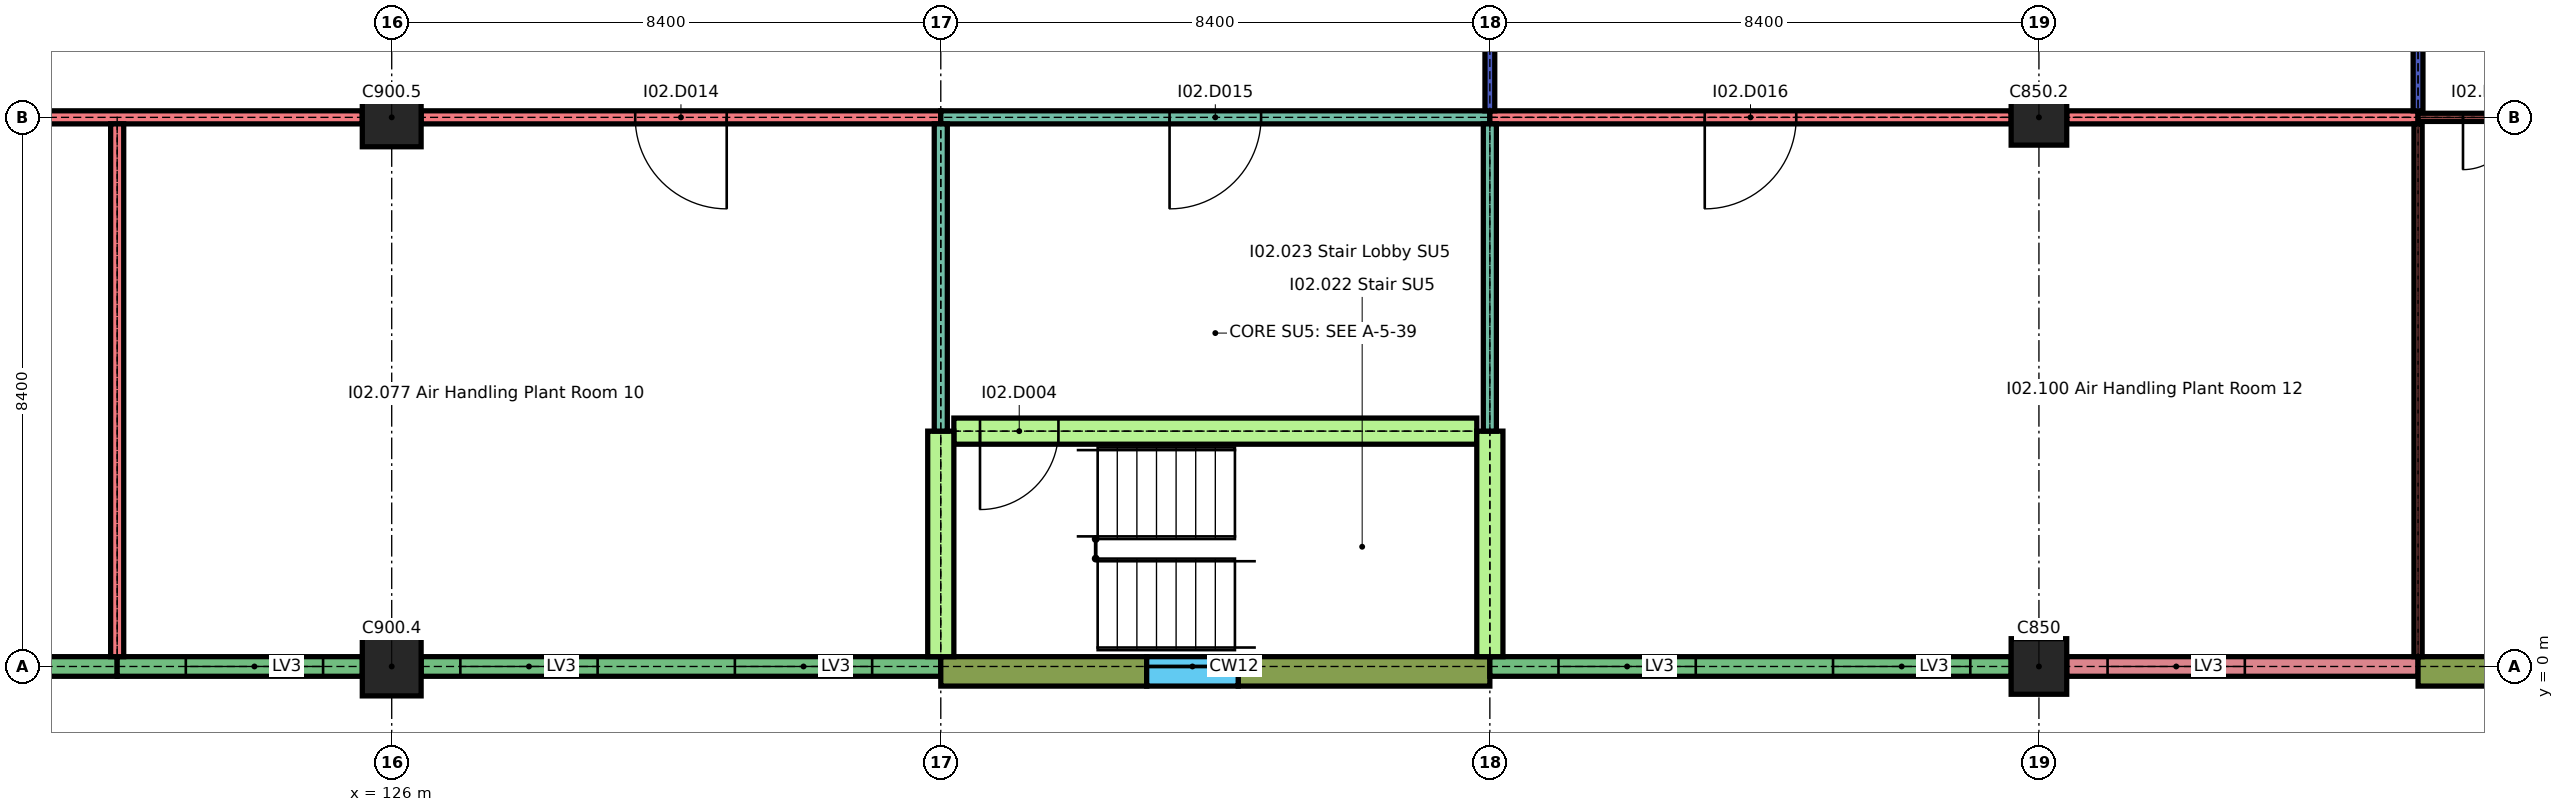
"""IFC4 building model, lengths in metres.
Left out: names, types, materials, properties, quantities, classifications, styles, units other than length and angle.
Written with IfcOpenShell. Run it as: python <this file> out.ifc"""

import sys

from ifc_helpers import new_model, si_unit, direction, frame, frame_2d, origin, origin_2d, place, context, subcontext, project, spatial, rectangle, extrude, element, fill, save


model = new_model("IFC4")
c1 = context("Model", 3, precision=1e-05, world=origin(), true_north=direction((0.0, 1.0)))
c2 = subcontext(c1, "Body", "Model", "MODEL_VIEW")
j1 = project(units=[si_unit("LENGTHUNIT", "METRE"), si_unit("PLANEANGLEUNIT", "RADIAN")], contexts=[c1])
p1 = place(None, origin())
s1 = spatial("IfcSite", under=j1, at=p1, CompositionType="ELEMENT")
p2 = place(p1, origin())
s2 = spatial("IfcBuilding", under=s1, at=p2, CompositionType="ELEMENT")
p3 = place(p2, frame((0.0, 0.0, 12.9)))
s3 = spatial("IfcBuildingStorey", under=s2, at=p3, CompositionType="ELEMENT", Elevation=12.9)
p4 = place(p3, frame((126.0, 0.0, 0.0), z_axis=(0.0, 0.0, 1.0), x_axis=(1.0, 0.0, 0.0)))
e1 = element("IfcColumn", 1, at=p4, inside=s3, PredefinedType="COLUMN", context=c2, shape_type="SweptSolid", body=[
    extrude(rectangle(XDim=0.9, YDim=0.9, at=origin_2d()), origin(), (0.0, 0.0, 1.0), 2.04),
])
p5 = place(p3, frame((151.2, 0.0, 0.0), z_axis=(0.0, 0.0, 1.0), x_axis=(1.0, 0.0, 0.0)))
e2 = element("IfcColumn", 2, at=p5, inside=s3, PredefinedType="COLUMN", context=c2, shape_type="SweptSolid", body=[
    extrude(rectangle(XDim=0.85, YDim=0.85, at=origin_2d()), origin(), (0.0, 0.0, 1.0), 2.04),
])
p6 = place(p3, frame((126.0, 8.4, 0.0), z_axis=(0.0, 0.0, 1.0), x_axis=(1.0, 0.0, 0.0)))
e3 = element("IfcColumn", 3, at=p6, inside=s3, PredefinedType="COLUMN", context=c2, shape_type="SweptSolid", body=[
    extrude(rectangle(XDim=0.9, YDim=0.9, at=origin_2d()), origin(), (0.0, 0.0, 1.0), 2.04),
])
p7 = place(p3, frame((151.2, 8.4, 0.0), z_axis=(0.0, 0.0, 1.0), x_axis=(1.0, 0.0, 0.0)))
e4 = element("IfcColumn", 4, at=p7, inside=s3, PredefinedType="COLUMN", context=c2, shape_type="SweptSolid", body=[
    extrude(rectangle(XDim=0.85, YDim=0.85, at=origin_2d()), origin(), (0.0, 0.0, 1.0), 2.04),
])
p8 = place(p3, frame((118.05, 0.0, 0.0), z_axis=(0.0, 0.0, 1.0), x_axis=(1.0, 0.0, 0.0)))
e5 = element("IfcWall", 5, at=p8, inside=s3, PredefinedType="SOLIDWALL", context=c2, shape_type="SweptSolid", body=[
    extrude(rectangle(XDim=3.75, YDim=0.3, at=frame_2d((1.875, 0.0))), origin(), (0.0, 0.0, 1.0), 1.74),
])
p9 = place(p8, frame((0.6, 0.0, 0.6)))
e6 = element("IfcOpeningElement", 6, at=p9, cuts=e5, PredefinedType="OPENING", context=c2, shape_type="SweptSolid", body=[
    extrude(rectangle(XDim=2.1, YDim=1.05, at=frame_2d((1.05, 0.525))), frame((0.0, 0.16, 0.0), z_axis=(0.0, -1.0, 0.0), x_axis=(1.0, 0.0, 0.0)), (0.0, 0.0, 1.0), 0.32),
])
p10 = place(p3, frame((121.8, 0.0, 0.0), z_axis=(0.0, 0.0, 1.0), x_axis=(1.0, 0.0, 0.0)))
e7 = element("IfcWall", 7, at=p10, inside=s3, PredefinedType="SOLIDWALL", context=c2, shape_type="SweptSolid", body=[
    extrude(rectangle(XDim=3.75, YDim=0.3, at=frame_2d((1.875, 0.0))), origin(), (0.0, 0.0, 1.0), 1.74),
])
p11 = place(p10, frame((1.05, 0.0, 0.6)))
e8 = element("IfcOpeningElement", 8, at=p11, cuts=e7, PredefinedType="OPENING", context=c2, shape_type="SweptSolid", body=[
    extrude(rectangle(XDim=2.1, YDim=1.05, at=frame_2d((1.05, 0.525))), frame((0.0, 0.16, 0.0), z_axis=(0.0, -1.0, 0.0), x_axis=(1.0, 0.0, 0.0)), (0.0, 0.0, 1.0), 0.32),
])
p12 = place(p3, frame((126.45, 0.0, 0.0), z_axis=(0.0, 0.0, 1.0), x_axis=(1.0, 0.0, 0.0)))
e9 = element("IfcWall", 9, at=p12, inside=s3, PredefinedType="SOLIDWALL", context=c2, shape_type="SweptSolid", body=[
    extrude(rectangle(XDim=7.95, YDim=0.3, at=frame_2d((3.975, 0.0))), origin(), (0.0, 0.0, 1.0), 1.74),
])
p13 = place(p12, frame((0.6, 0.0, 0.6)))
e10 = element("IfcOpeningElement", 10, at=p13, cuts=e9, PredefinedType="OPENING", context=c2, shape_type="SweptSolid", body=[
    extrude(rectangle(XDim=2.1, YDim=1.05, at=frame_2d((1.05, 0.525))), frame((0.0, 0.16, 0.0), z_axis=(0.0, -1.0, 0.0), x_axis=(1.0, 0.0, 0.0)), (0.0, 0.0, 1.0), 0.32),
])
p14 = place(p12, frame((4.8, 0.0, 0.6)))
e11 = element("IfcOpeningElement", 11, at=p14, cuts=e9, PredefinedType="OPENING", context=c2, shape_type="SweptSolid", body=[
    extrude(rectangle(XDim=2.1, YDim=1.05, at=frame_2d((1.05, 0.525))), frame((0.0, 0.16, 0.0), z_axis=(0.0, -1.0, 0.0), x_axis=(1.0, 0.0, 0.0)), (0.0, 0.0, 1.0), 0.32),
])
p15 = place(p3, frame((134.4, -0.075, 0.0), z_axis=(0.0, 0.0, 1.0), x_axis=(1.0, 0.0, 0.0)))
e12 = element("IfcWall", 12, at=p15, inside=s3, PredefinedType="SOLIDWALL", context=c2, shape_type="SweptSolid", body=[
    extrude(rectangle(XDim=3.15, YDim=0.45, at=frame_2d((1.575, 0.0))), origin(), (0.0, 0.0, 1.0), 2.04),
])
p16 = place(p3, frame((138.95, -0.075, 0.0), z_axis=(0.0, 0.0, 1.0), x_axis=(1.0, 0.0, 0.0)))
e13 = element("IfcWall", 13, at=p16, inside=s3, PredefinedType="SOLIDWALL", context=c2, shape_type="SweptSolid", body=[
    extrude(rectangle(XDim=3.85, YDim=0.45, at=frame_2d((1.925, 0.0))), origin(), (0.0, 0.0, 1.0), 2.04),
])
p17 = place(p3, frame((137.55, -0.075, 0.0), z_axis=(0.0, 0.0, 1.0), x_axis=(1.0, 0.0, 0.0)))
e14 = element("IfcWall", 14, at=p17, inside=s3, PredefinedType="SOLIDWALL", context=c2, shape_type="SweptSolid", body=[
    extrude(rectangle(XDim=1.4, YDim=0.45, at=frame_2d((0.7, 0.0))), origin(), (0.0, 0.0, 1.0), 0.6),
])
p18 = place(p3, frame((142.8, 0.0, 0.0), z_axis=(0.0, 0.0, 1.0), x_axis=(1.0, 0.0, 0.0)))
e15 = element("IfcWall", 15, at=p18, inside=s3, PredefinedType="SOLIDWALL", context=c2, shape_type="SweptSolid", body=[
    extrude(rectangle(XDim=7.975, YDim=0.3, at=frame_2d((3.987, 0.0))), origin(), (0.0, 0.0, 1.0), 1.74),
])
p19 = place(p18, frame((1.05, 0.0, 0.6)))
e16 = element("IfcOpeningElement", 16, at=p19, cuts=e15, PredefinedType="OPENING", context=c2, shape_type="SweptSolid", body=[
    extrude(rectangle(XDim=2.1, YDim=1.05, at=frame_2d((1.05, 0.525))), frame((0.0, 0.16, 0.0), z_axis=(0.0, -1.0, 0.0), x_axis=(1.0, 0.0, 0.0)), (0.0, 0.0, 1.0), 0.32),
])
p20 = place(p18, frame((5.25, 0.0, 0.6)))
e17 = element("IfcOpeningElement", 17, at=p20, cuts=e15, PredefinedType="OPENING", context=c2, shape_type="SweptSolid", body=[
    extrude(rectangle(XDim=2.1, YDim=1.05, at=frame_2d((1.05, 0.525))), frame((0.0, 0.16, 0.0), z_axis=(0.0, -1.0, 0.0), x_axis=(1.0, 0.0, 0.0)), (0.0, 0.0, 1.0), 0.32),
])
p21 = place(p3, frame((151.625, 0.0, 0.0), z_axis=(0.0, 0.0, 1.0), x_axis=(1.0, 0.0, 0.0)))
e18 = element("IfcWall", 18, at=p21, inside=s3, PredefinedType="SOLIDWALL", context=c2, shape_type="SweptSolid", body=[
    extrude(rectangle(XDim=5.375, YDim=0.3, at=frame_2d((2.688, 0.0))), origin(), (0.0, 0.0, 1.0), 2.04),
])
p22 = place(p21, frame((0.625, 0.0, 0.6)))
e19 = element("IfcOpeningElement", 19, at=p22, cuts=e18, PredefinedType="OPENING", context=c2, shape_type="SweptSolid", body=[
    extrude(rectangle(XDim=2.1, YDim=1.05, at=frame_2d((1.05, 0.525))), frame((0.0, 0.16, 0.0), z_axis=(0.0, -1.0, 0.0), x_axis=(1.0, 0.0, 0.0)), (0.0, 0.0, 1.0), 0.32),
])
p23 = place(p3, frame((157.0, -0.075, 0.0), z_axis=(0.0, 0.0, 1.0), x_axis=(1.0, 0.0, 0.0)))
e20 = element("IfcWall", 20, at=p23, inside=s3, PredefinedType="SOLIDWALL", context=c2, shape_type="SweptSolid", body=[
    extrude(rectangle(XDim=2.175, YDim=0.45, at=frame_2d((1.087, 0.0))), origin(), (0.0, 0.0, 1.0), 2.04),
])
p24 = place(p3, frame((134.6, 3.6, 0.0), z_axis=(0.0, 0.0, 1.0), x_axis=(1.0, 0.0, 0.0)))
e21 = element("IfcWall", 21, at=p24, inside=s3, PredefinedType="SHEAR", context=c2, shape_type="SweptSolid", body=[
    extrude(rectangle(XDim=8.0, YDim=0.4, at=frame_2d((4.0, 0.0))), origin(), (0.0, 0.0, 1.0), 2.04),
])
p25 = place(p24, frame((0.4, 0.0, 0.0)))
e22 = element("IfcOpeningElement", 22, at=p25, cuts=e21, PredefinedType="OPENING", context=c2, shape_type="SweptSolid", body=[
    extrude(rectangle(XDim=1.2, YDim=2.0, at=frame_2d((0.6, 1.0))), frame((0.0, 0.21, 0.0), z_axis=(0.0, -1.0, 0.0), x_axis=(1.0, 0.0, 0.0)), (0.0, 0.0, 1.0), 0.42),
])
p26 = place(p3, frame((118.05, 8.4, 0.0), z_axis=(0.0, 0.0, 1.0), x_axis=(1.0, 0.0, 0.0)))
e23 = element("IfcWall", 23, at=p26, inside=s3, PredefinedType="SOLIDWALL", context=c2, shape_type="SweptSolid", body=[
    extrude(rectangle(XDim=7.5, YDim=0.2, at=frame_2d((3.75, 0.0))), origin(), (0.0, 0.0, 1.0), 2.04),
])
p27 = place(p26, frame((1.275, 0.0, 0.0)))
e24 = element("IfcOpeningElement", 24, at=p27, cuts=e23, PredefinedType="OPENING", context=c2, shape_type="SweptSolid", body=[
    extrude(rectangle(XDim=1.4, YDim=2.0, at=frame_2d((0.7, 1.0))), frame((0.0, 0.11, 0.0), z_axis=(0.0, -1.0, 0.0), x_axis=(1.0, 0.0, 0.0)), (0.0, 0.0, 1.0), 0.22),
])
p28 = place(p3, frame((126.45, 8.4, 0.0), z_axis=(0.0, 0.0, 1.0), x_axis=(1.0, 0.0, 0.0)))
e25 = element("IfcWall", 25, at=p28, inside=s3, PredefinedType="SOLIDWALL", context=c2, shape_type="SweptSolid", body=[
    extrude(rectangle(XDim=7.95, YDim=0.2, at=frame_2d((3.975, 0.0))), origin(), (0.0, 0.0, 1.0), 2.04),
])
p29 = place(p28, frame((3.275, 0.0, 0.0)))
e26 = element("IfcOpeningElement", 26, at=p29, cuts=e25, PredefinedType="OPENING", context=c2, shape_type="SweptSolid", body=[
    extrude(rectangle(XDim=1.4, YDim=2.0, at=frame_2d((0.7, 1.0))), frame((0.0, 0.11, 0.0), z_axis=(0.0, -1.0, 0.0), x_axis=(1.0, 0.0, 0.0)), (0.0, 0.0, 1.0), 0.22),
])
p30 = place(p3, frame((134.4, 8.4, 0.0), z_axis=(0.0, 0.0, 1.0), x_axis=(1.0, 0.0, 0.0)))
e27 = element("IfcWall", 27, at=p30, inside=s3, PredefinedType="PARTITIONING", context=c2, shape_type="SweptSolid", body=[
    extrude(rectangle(XDim=8.4, YDim=0.2, at=frame_2d((4.2, 0.0))), origin(), (0.0, 0.0, 1.0), 2.04),
])
p31 = place(p30, frame((3.5, 0.0, 0.0)))
e28 = element("IfcOpeningElement", 28, at=p31, cuts=e27, PredefinedType="OPENING", context=c2, shape_type="SweptSolid", body=[
    extrude(rectangle(XDim=1.4, YDim=2.0, at=frame_2d((0.7, 1.0))), frame((0.0, 0.11, 0.0), z_axis=(0.0, -1.0, 0.0), x_axis=(1.0, 0.0, 0.0)), (0.0, 0.0, 1.0), 0.22),
])
p32 = place(p3, frame((142.8, 8.4, 0.0), z_axis=(0.0, 0.0, 1.0), x_axis=(1.0, 0.0, 0.0)))
e29 = element("IfcWall", 29, at=p32, inside=s3, PredefinedType="SOLIDWALL", context=c2, shape_type="SweptSolid", body=[
    extrude(rectangle(XDim=7.975, YDim=0.2, at=frame_2d((3.987, 0.0))), origin(), (0.0, 0.0, 1.0), 2.04),
])
p33 = place(p32, frame((3.288, 0.0, 0.0)))
e30 = element("IfcOpeningElement", 30, at=p33, cuts=e29, PredefinedType="OPENING", context=c2, shape_type="SweptSolid", body=[
    extrude(rectangle(XDim=1.4, YDim=2.0, at=frame_2d((0.7, 1.0))), frame((0.0, 0.11, 0.0), z_axis=(0.0, -1.0, 0.0), x_axis=(1.0, 0.0, 0.0)), (0.0, 0.0, 1.0), 0.22),
])
p34 = place(p3, frame((151.625, 8.4, 0.0), z_axis=(0.0, 0.0, 1.0), x_axis=(1.0, 0.0, 0.0)))
e31 = element("IfcWall", 31, at=p34, inside=s3, PredefinedType="SOLIDWALL", context=c2, shape_type="SweptSolid", body=[
    extrude(rectangle(XDim=5.375, YDim=0.2, at=frame_2d((2.688, 0.0))), origin(), (0.0, 0.0, 1.0), 2.04),
])
p35 = place(p3, frame((157.0, 8.4, 0.0), z_axis=(0.0, 0.0, 1.0), x_axis=(1.0, 0.0, 0.0)))
e32 = element("IfcWall", 32, at=p35, inside=s3, PredefinedType="SOLIDWALL", context=c2, shape_type="SweptSolid", body=[
    extrude(rectangle(XDim=2.175, YDim=0.125, at=frame_2d((1.087, 0.0))), origin(), (0.0, 0.0, 1.0), 2.04),
])
p36 = place(p35, frame((0.688, 0.0, 0.0)))
e33 = element("IfcOpeningElement", 33, at=p36, cuts=e32, PredefinedType="OPENING", context=c2, shape_type="SweptSolid", body=[
    extrude(rectangle(XDim=0.8, YDim=2.0, at=frame_2d((0.4, 1.0))), frame((0.0, 0.073, 0.0), z_axis=(0.0, -1.0, 0.0), x_axis=(1.0, 0.0, 0.0)), (0.0, 0.0, 1.0), 0.145),
])
p37 = place(p3, frame((121.8, 0.15, 0.0), z_axis=(0.0, 0.0, 1.0), x_axis=(0.0, 1.0, 0.0)))
e34 = element("IfcWall", 34, at=p37, inside=s3, PredefinedType="SOLIDWALL", context=c2, shape_type="SweptSolid", body=[
    extrude(rectangle(XDim=8.15, YDim=0.2, at=frame_2d((4.075, 0.0))), origin(), (0.0, 0.0, 1.0), 2.04),
])
p38 = place(p3, frame((134.4, 0.15, 0.0), z_axis=(0.0, 0.0, 1.0), x_axis=(0.0, 1.0, 0.0)))
e35 = element("IfcWall", 35, at=p38, inside=s3, PredefinedType="SHEAR", context=c2, shape_type="SweptSolid", body=[
    extrude(rectangle(XDim=3.45, YDim=0.4, at=frame_2d((1.725, 0.0))), origin(), (0.0, 0.0, 1.0), 2.04),
])
p39 = place(p3, frame((134.4, 3.6, 0.0), z_axis=(0.0, 0.0, 1.0), x_axis=(0.0, 1.0, 0.0)))
e36 = element("IfcWall", 36, at=p39, inside=s3, PredefinedType="PARTITIONING", context=c2, shape_type="SweptSolid", body=[
    extrude(rectangle(XDim=4.7, YDim=0.2, at=frame_2d((2.35, 0.0))), origin(), (0.0, 0.0, 1.0), 2.04),
])
p40 = place(p3, frame((142.8, 0.15, 0.0), z_axis=(0.0, 0.0, 1.0), x_axis=(0.0, 1.0, 0.0)))
e37 = element("IfcWall", 37, at=p40, inside=s3, PredefinedType="SHEAR", context=c2, shape_type="SweptSolid", body=[
    extrude(rectangle(XDim=3.45, YDim=0.4, at=frame_2d((1.725, 0.0))), origin(), (0.0, 0.0, 1.0), 2.04),
])
p41 = place(p3, frame((142.8, 3.6, 0.0), z_axis=(0.0, 0.0, 1.0), x_axis=(0.0, 1.0, 0.0)))
e38 = element("IfcWall", 38, at=p41, inside=s3, PredefinedType="PARTITIONING", context=c2, shape_type="SweptSolid", body=[
    extrude(rectangle(XDim=4.7, YDim=0.2, at=frame_2d((2.35, 0.0))), origin(), (0.0, 0.0, 1.0), 2.04),
])
p42 = place(p3, frame((142.8, 8.5, 0.0), z_axis=(0.0, 0.0, 1.0), x_axis=(0.0, 1.0, 0.0)))
e39 = element("IfcWall", 39, at=p42, inside=s3, PredefinedType="PARTITIONING", context=c2, shape_type="SweptSolid", body=[
    extrude(rectangle(XDim=8.3, YDim=0.15, at=frame_2d((4.15, 0.0))), origin(), (0.0, 0.0, 1.0), 2.04),
])
p43 = place(p3, frame((157.0, 0.15, 0.0), z_axis=(0.0, 0.0, 1.0), x_axis=(0.0, 1.0, 0.0)))
e40 = element("IfcWall", 40, at=p43, inside=s3, PredefinedType="SOLIDWALL", context=c2, shape_type="SweptSolid", body=[
    extrude(rectangle(XDim=8.15, YDim=0.125, at=frame_2d((4.075, 0.0))), origin(), (0.0, 0.0, 1.0), 2.04),
])
p44 = place(p3, frame((157.0, 8.5, 0.0), z_axis=(0.0, 0.0, 1.0), x_axis=(0.0, 1.0, 0.0)))
e41 = element("IfcWall", 41, at=p44, inside=s3, PredefinedType="PARTITIONING", context=c2, shape_type="SweptSolid", body=[
    extrude(rectangle(XDim=16.625, YDim=0.15, at=frame_2d((8.312, 0.0))), origin(), (0.0, 0.0, 1.0), 2.04),
])
p45 = place(p44, frame((7.613, 0.0, 0.0)))
e42 = element("IfcOpeningElement", 42, at=p45, cuts=e41, PredefinedType="OPENING", context=c2, shape_type="SweptSolid", body=[
    extrude(rectangle(XDim=1.4, YDim=2.0, at=frame_2d((0.7, 1.0))), frame((0.0, 0.085, 0.0), z_axis=(0.0, -1.0, 0.0), x_axis=(1.0, 0.0, 0.0)), (0.0, 0.0, 1.0), 0.17),
])
p46 = place(p11, origin())
e43 = element("IfcWindow", 43, at=p46, inside=s3, PartitioningType="SINGLE_PANEL", PredefinedType="WINDOW", context=c2, shape_type="SweptSolid", body=[
    extrude(rectangle(XDim=2.1, YDim=1.05, at=frame_2d((1.05, 0.525))), frame((0.0, 0.075, 0.0), z_axis=(0.0, -1.0, 0.0), x_axis=(1.0, 0.0, 0.0)), (0.0, 0.0, 1.0), 0.15),
])
fill(e8, e43)
p47 = place(p13, origin())
e44 = element("IfcWindow", 44, at=p47, inside=s3, PartitioningType="SINGLE_PANEL", PredefinedType="WINDOW", context=c2, shape_type="SweptSolid", body=[
    extrude(rectangle(XDim=2.1, YDim=1.05, at=frame_2d((1.05, 0.525))), frame((0.0, 0.075, 0.0), z_axis=(0.0, -1.0, 0.0), x_axis=(1.0, 0.0, 0.0)), (0.0, 0.0, 1.0), 0.15),
])
fill(e10, e44)
p48 = place(p14, origin())
e45 = element("IfcWindow", 45, at=p48, inside=s3, PartitioningType="SINGLE_PANEL", PredefinedType="WINDOW", context=c2, shape_type="SweptSolid", body=[
    extrude(rectangle(XDim=2.1, YDim=1.05, at=frame_2d((1.05, 0.525))), frame((0.0, 0.075, 0.0), z_axis=(0.0, -1.0, 0.0), x_axis=(1.0, 0.0, 0.0)), (0.0, 0.0, 1.0), 0.15),
])
fill(e11, e45)
p49 = place(p19, origin())
e46 = element("IfcWindow", 46, at=p49, inside=s3, PartitioningType="SINGLE_PANEL", PredefinedType="WINDOW", context=c2, shape_type="SweptSolid", body=[
    extrude(rectangle(XDim=2.1, YDim=1.05, at=frame_2d((1.05, 0.525))), frame((0.0, 0.075, 0.0), z_axis=(0.0, -1.0, 0.0), x_axis=(1.0, 0.0, 0.0)), (0.0, 0.0, 1.0), 0.15),
])
fill(e16, e46)
p50 = place(p20, origin())
e47 = element("IfcWindow", 47, at=p50, inside=s3, PartitioningType="SINGLE_PANEL", PredefinedType="WINDOW", context=c2, shape_type="SweptSolid", body=[
    extrude(rectangle(XDim=2.1, YDim=1.05, at=frame_2d((1.05, 0.525))), frame((0.0, 0.075, 0.0), z_axis=(0.0, -1.0, 0.0), x_axis=(1.0, 0.0, 0.0)), (0.0, 0.0, 1.0), 0.15),
])
fill(e17, e47)
p51 = place(p22, origin())
e48 = element("IfcWindow", 48, at=p51, inside=s3, PartitioningType="SINGLE_PANEL", PredefinedType="WINDOW", context=c2, shape_type="SweptSolid", body=[
    extrude(rectangle(XDim=2.1, YDim=1.05, at=frame_2d((1.05, 0.525))), frame((0.0, 0.075, 0.0), z_axis=(0.0, -1.0, 0.0), x_axis=(1.0, 0.0, 0.0)), (0.0, 0.0, 1.0), 0.15),
])
fill(e19, e48)
p52 = place(p25, origin())
e49 = element("IfcDoor", 49, at=p52, inside=s3, OperationType="SINGLE_SWING_LEFT", PredefinedType="DOOR", context=c2, shape_type="SweptSolid", body=[
    extrude(rectangle(XDim=1.2, YDim=2.0, at=frame_2d((0.6, 1.0))), frame((0.0, 0.025, 0.0), z_axis=(0.0, -1.0, 0.0), x_axis=(1.0, 0.0, 0.0)), (0.0, 0.0, 1.0), 0.05),
])
fill(e22, e49)
p53 = place(p29, origin())
e50 = element("IfcDoor", 50, at=p53, inside=s3, OperationType="SINGLE_SWING_RIGHT", PredefinedType="DOOR", context=c2, shape_type="SweptSolid", body=[
    extrude(rectangle(XDim=1.4, YDim=2.0, at=frame_2d((0.7, 1.0))), frame((0.0, 0.025, 0.0), z_axis=(0.0, -1.0, 0.0), x_axis=(1.0, 0.0, 0.0)), (0.0, 0.0, 1.0), 0.05),
])
fill(e26, e50)
p54 = place(p31, origin())
e51 = element("IfcDoor", 51, at=p54, inside=s3, OperationType="SINGLE_SWING_LEFT", PredefinedType="DOOR", context=c2, shape_type="SweptSolid", body=[
    extrude(rectangle(XDim=1.4, YDim=2.0, at=frame_2d((0.7, 1.0))), frame((0.0, 0.03, 0.0), z_axis=(0.0, -1.0, 0.0), x_axis=(1.0, 0.0, 0.0)), (0.0, 0.0, 1.0), 0.06),
])
fill(e28, e51)
p55 = place(p33, origin())
e52 = element("IfcDoor", 52, at=p55, inside=s3, OperationType="SINGLE_SWING_LEFT", PredefinedType="DOOR", context=c2, shape_type="SweptSolid", body=[
    extrude(rectangle(XDim=1.4, YDim=2.0, at=frame_2d((0.7, 1.0))), frame((0.0, 0.025, 0.0), z_axis=(0.0, -1.0, 0.0), x_axis=(1.0, 0.0, 0.0)), (0.0, 0.0, 1.0), 0.05),
])
fill(e30, e52)
p56 = place(p36, origin())
e53 = element("IfcDoor", 53, at=p56, inside=s3, OperationType="SINGLE_SWING_LEFT", PredefinedType="DOOR", context=c2, shape_type="SweptSolid", body=[
    extrude(rectangle(XDim=0.8, YDim=2.0, at=frame_2d((0.4, 1.0))), frame((0.0, 0.03, 0.0), z_axis=(0.0, -1.0, 0.0), x_axis=(1.0, 0.0, 0.0)), (0.0, 0.0, 1.0), 0.06),
])
fill(e33, e53)
save(model, sys.argv[1])
